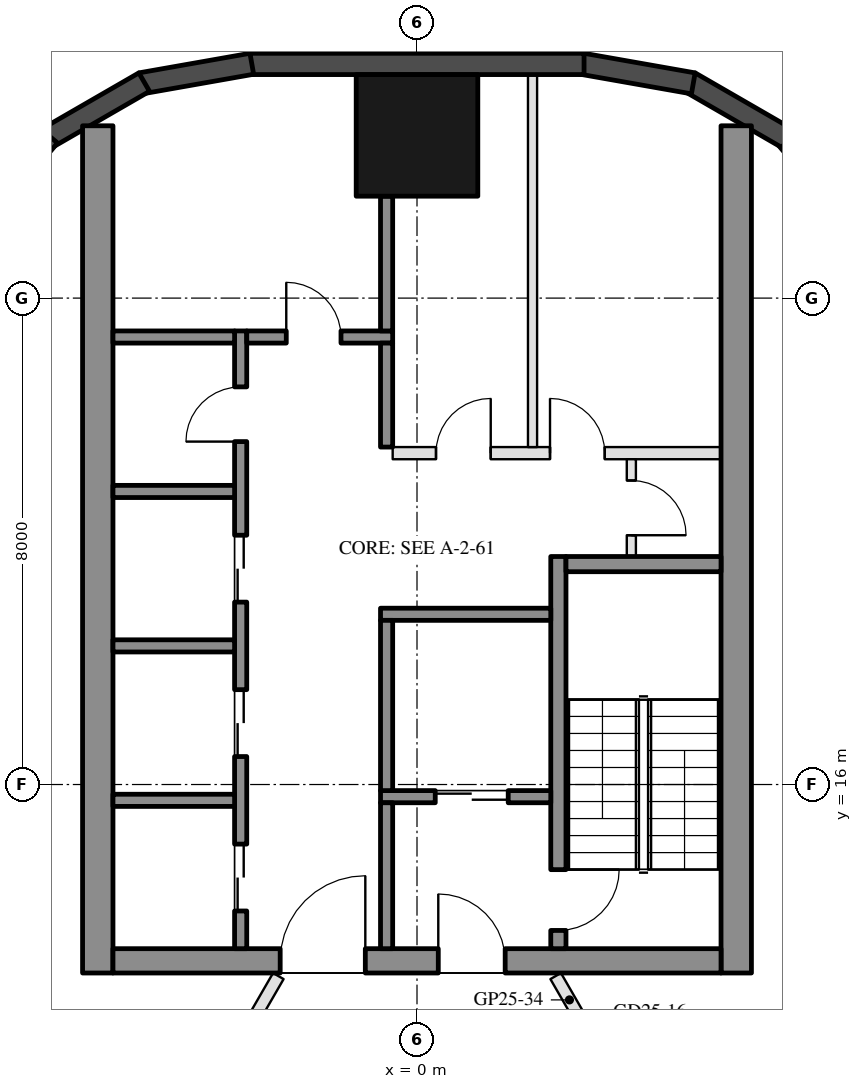
"""IFC4 building model, lengths in metres.
Left out: names, types, materials, properties, quantities, classifications, styles, units other than length and angle.
Written with IfcOpenShell. Run it as: python <this file> out.ifc"""

import sys

from ifc_helpers import new_model, si_unit, direction, frame, frame_2d, origin, origin_2d, place, context, subcontext, project, spatial, rectangle, hollow_rectangle, extrude, boolean, halfspace, element, fill, save


model = new_model("IFC4")
c1 = context("Model", 3, precision=1e-05, world=origin(), true_north=direction((0.0, 1.0)))
c2 = subcontext(c1, "Body", "Model", "MODEL_VIEW")
j1 = project(units=[si_unit("LENGTHUNIT", "METRE"), si_unit("PLANEANGLEUNIT", "RADIAN")], contexts=[c1])
p1 = place(None, origin())
s1 = spatial("IfcSite", under=j1, at=p1, CompositionType="ELEMENT")
p2 = place(p1, origin())
s2 = spatial("IfcBuilding", under=s1, at=p2, CompositionType="ELEMENT")
p3 = place(p2, frame((0.0, 0.0, 265.2)))
s3 = spatial("IfcBuildingStorey", under=s2, at=p3, CompositionType="ELEMENT", Elevation=265.2)
p4 = place(p3, frame((0.0, 26.676, 0.0), z_axis=(0.0, -0.21982618752, 0.975539054718), x_axis=(1.0, 0.0, 0.0)))
e1 = element("IfcColumn", 1, at=p4, inside=s3, PredefinedType="COLUMN", context=c2, shape_type="SweptSolid", body=[
    boolean("DIFFERENCE", boolean("DIFFERENCE", extrude(hollow_rectangle(XDim=2.0, YDim=2.0, WallThickness=0.05, at=origin_2d()), origin(), (0.0, 0.0, 1.0), 3.793), halfspace(frame((0.0, 0.0, 0.113), z_axis=(0.0, 0.0, 1.0), x_axis=(1.0, 0.0, 0.0)), True)), halfspace(frame((0.0, 0.0, 3.679), z_axis=(0.0, 0.0, 1.0), x_axis=(1.0, 0.0, 0.0)), False)),
])
p5 = place(p3, frame((7.239, 25.243, 0.0), z_axis=(0.0, 0.0, 1.0), x_axis=(-0.642756798522, 0.7660702957, 0.0)))
e2 = element("IfcWall", 2, at=p5, inside=s3, PredefinedType="SOLIDWALL", context=c2, shape_type="SweptSolid", body=[
    extrude(rectangle(XDim=1.855, YDim=0.35, at=frame_2d((0.928, 0.0))), origin(), (0.0, 0.0, 1.0), 3.55),
])
p6 = place(p3, frame((6.093, 26.625, 0.0), z_axis=(0.0, 0.0, 1.0), x_axis=(-0.866080385203, 0.499904757295, 0.0)))
e3 = element("IfcWall", 3, at=p6, inside=s3, PredefinedType="SOLIDWALL", context=c2, shape_type="SweptSolid", body=[
    extrude(rectangle(XDim=1.855, YDim=0.35, at=frame_2d((0.927, 0.0))), origin(), (0.0, 0.0, 1.0), 3.55),
])
p7 = place(p3, frame((4.544, 27.532, 0.0), z_axis=(0.0, 0.0, 1.0), x_axis=(-0.984795480386, 0.173717764815, 0.0)))
e4 = element("IfcWall", 4, at=p7, inside=s3, PredefinedType="SOLIDWALL", context=c2, shape_type="SweptSolid", body=[
    extrude(rectangle(XDim=1.855, YDim=0.35, at=frame_2d((0.928, 0.0))), origin(), (0.0, 0.0, 1.0), 3.55),
])
p8 = place(p3, frame((2.747, 27.851, 0.0), z_axis=(0.0, 0.0, 1.0), x_axis=(-1.0, 0.0, 0.0)))
e5 = element("IfcWall", 5, at=p8, inside=s3, PredefinedType="SOLIDWALL", context=c2, shape_type="SweptSolid", body=[
    extrude(rectangle(XDim=5.495, YDim=0.35, at=frame_2d((2.747, 0.0))), origin(), (0.0, 0.0, 1.0), 3.55),
])
p9 = place(p3, frame((-2.717, 27.854, 0.0), z_axis=(0.0, 0.0, 1.0), x_axis=(-0.984795480386, -0.173717764815, 0.0)))
e6 = element("IfcWall", 6, at=p9, inside=s3, PredefinedType="SOLIDWALL", context=c2, shape_type="SweptSolid", body=[
    extrude(rectangle(XDim=1.855, YDim=0.35, at=frame_2d((0.928, 0.0))), origin(), (0.0, 0.0, 1.0), 3.55),
])
p10 = place(p3, frame((-4.487, 27.552, 0.0), z_axis=(0.0, 0.0, 1.0), x_axis=(-0.866080385203, -0.499904757295, 0.0)))
e7 = element("IfcWall", 7, at=p10, inside=s3, PredefinedType="SOLIDWALL", context=c2, shape_type="SweptSolid", body=[
    extrude(rectangle(XDim=1.855, YDim=0.35, at=frame_2d((0.927, 0.0))), origin(), (0.0, 0.0, 1.0), 3.55),
])
p11 = place(p3, frame((-6.046, 26.664, 0.0), z_axis=(0.0, 0.0, 1.0), x_axis=(-0.642756798522, -0.7660702957, 0.0)))
e8 = element("IfcWall", 8, at=p11, inside=s3, PredefinedType="SOLIDWALL", context=c2, shape_type="SweptSolid", body=[
    extrude(rectangle(XDim=1.855, YDim=0.35, at=frame_2d((0.928, 0.0))), origin(), (0.0, 0.0, 1.0), 3.55),
])
for number, where, z_axis, x_axis in (
    (9, (5.25, 12.9, 0.0), (0.0, 0.0, 1.0), (0.0, 1.0, 0.0)),
    (10, (-5.25, 12.9, 0.0), (0.0, 0.0, 1.0), (0.0, 1.0, 0.0)),
):
    element("IfcWall", number, at=place(p3, frame(where, z_axis=z_axis, x_axis=x_axis)), inside=s3, PredefinedType="SHEAR", context=c2, shape_type="SweptSolid", body=[
        extrude(rectangle(XDim=13.934, YDim=0.5, at=frame_2d((6.967, 0.0))), origin(), (0.0, 0.0, 1.0), 3.5),
    ])
p12 = place(p3, frame((5.0, 13.1, 0.0), z_axis=(0.0, 0.0, 1.0), x_axis=(-1.0, 0.0, 0.0)))
e11 = element("IfcWall", 11, at=p12, inside=s3, PredefinedType="SHEAR", context=c2, shape_type="SweptSolid", body=[
    extrude(rectangle(XDim=10.0, YDim=0.4, at=frame_2d((5.0, 0.0))), origin(), (0.0, 0.0, 1.0), 3.5),
])
p13 = place(p12, frame((3.55, 0.0, 0.0)))
e12 = element("IfcOpeningElement", 12, at=p13, cuts=e11, PredefinedType="OPENING", context=c2, shape_type="SweptSolid", body=[
    extrude(rectangle(XDim=1.1, YDim=2.1, at=frame_2d((0.55, 1.05))), frame((0.0, 0.21, 0.0), z_axis=(0.0, -1.0, 0.0), x_axis=(1.0, 0.0, 0.0)), (0.0, 0.0, 1.0), 0.42),
])
p14 = place(p12, frame((5.85, 0.0, 0.0)))
e13 = element("IfcOpeningElement", 13, at=p14, cuts=e11, PredefinedType="OPENING", context=c2, shape_type="SweptSolid", body=[
    extrude(rectangle(XDim=1.4, YDim=2.1, at=frame_2d((0.7, 1.05))), frame((0.0, 0.21, 0.0), z_axis=(0.0, -1.0, 0.0), x_axis=(1.0, 0.0, 0.0)), (0.0, 0.0, 1.0), 0.42),
])
p15 = place(p3, frame((2.325, 13.3, 0.0), z_axis=(0.0, 0.0, 1.0), x_axis=(0.0, 1.0, 0.0)))
e14 = element("IfcWall", 14, at=p15, inside=s3, PredefinedType="SHEAR", context=c2, shape_type="SweptSolid", body=[
    extrude(rectangle(XDim=6.45, YDim=0.25, at=frame_2d((3.225, 0.0))), origin(), (0.0, 0.0, 1.0), 3.5),
])
p16 = place(p15, frame((0.3, 0.0, 0.0)))
e15 = element("IfcOpeningElement", 15, at=p16, cuts=e14, PredefinedType="OPENING", context=c2, shape_type="SweptSolid", body=[
    extrude(rectangle(XDim=1.0, YDim=2.1, at=frame_2d((0.5, 1.05))), frame((0.0, 0.135, 0.0), z_axis=(0.0, -1.0, 0.0), x_axis=(1.0, 0.0, 0.0)), (0.0, 0.0, 1.0), 0.27),
])
p17 = place(p3, frame((5.0, 19.625, 0.0), z_axis=(0.0, 0.0, 1.0), x_axis=(-1.0, 0.0, 0.0)))
e16 = element("IfcWall", 16, at=p17, inside=s3, PredefinedType="SHEAR", context=c2, shape_type="SweptSolid", body=[
    extrude(rectangle(XDim=2.55, YDim=0.25, at=frame_2d((1.275, 0.0))), origin(), (0.0, 0.0, 1.0), 3.5),
])
p18 = place(p3, frame((2.2, 18.8, 0.0), z_axis=(0.0, 0.0, 1.0), x_axis=(-1.0, 0.0, 0.0)))
e17 = element("IfcWall", 17, at=p18, inside=s3, PredefinedType="SHEAR", context=c2, shape_type="SweptSolid", body=[
    extrude(rectangle(XDim=2.8, YDim=0.2, at=frame_2d((1.4, 0.0))), origin(), (0.0, 0.0, 1.0), 3.5),
])
p19 = place(p3, frame((2.2, 15.8, 0.0), z_axis=(0.0, 0.0, 1.0), x_axis=(-1.0, 0.0, 0.0)))
e18 = element("IfcWall", 18, at=p19, inside=s3, PredefinedType="SHEAR", context=c2, shape_type="SweptSolid", body=[
    extrude(rectangle(XDim=2.8, YDim=0.2, at=frame_2d((1.4, 0.0))), origin(), (0.0, 0.0, 1.0), 3.5),
])
p20 = place(p19, frame((0.7, 0.0, 0.0)))
e19 = element("IfcOpeningElement", 19, at=p20, cuts=e18, PredefinedType="OPENING", context=c2, shape_type="SweptSolid", body=[
    extrude(rectangle(XDim=1.2, YDim=2.1, at=frame_2d((0.6, 1.05))), frame((0.0, 0.11, 0.0), z_axis=(0.0, -1.0, 0.0), x_axis=(1.0, 0.0, 0.0)), (0.0, 0.0, 1.0), 0.22),
])
p21 = place(p3, frame((-0.5, 15.9, 0.0), z_axis=(0.0, 0.0, 1.0), x_axis=(0.0, 1.0, 0.0)))
e20 = element("IfcWall", 20, at=p21, inside=s3, PredefinedType="SHEAR", context=c2, shape_type="SweptSolid", body=[
    extrude(rectangle(XDim=2.8, YDim=0.2, at=frame_2d((1.4, 0.0))), origin(), (0.0, 0.0, 1.0), 3.5),
])
p22 = place(p3, frame((-0.5, 13.3, 0.0), z_axis=(0.0, 0.0, 1.0), x_axis=(0.0, 1.0, 0.0)))
e21 = element("IfcWall", 21, at=p22, inside=s3, PredefinedType="SHEAR", context=c2, shape_type="SweptSolid", body=[
    extrude(rectangle(XDim=2.4, YDim=0.2, at=frame_2d((1.2, 0.0))), origin(), (0.0, 0.0, 1.0), 3.5),
])
p23 = place(p3, frame((-2.9, 13.3, 0.0), z_axis=(0.0, 0.0, 1.0), x_axis=(0.0, 1.0, 0.0)))
e22 = element("IfcWall", 22, at=p23, inside=s3, PredefinedType="SHEAR", context=c2, shape_type="SweptSolid", body=[
    extrude(rectangle(XDim=10.16, YDim=0.2, at=frame_2d((5.08, 0.0))), origin(), (0.0, 0.0, 1.0), 3.5),
])
p24 = place(p23, frame((0.62, 0.0, 0.0)))
e23 = element("IfcOpeningElement", 23, at=p24, cuts=e22, PredefinedType="OPENING", context=c2, shape_type="SweptSolid", body=[
    extrude(rectangle(XDim=1.1, YDim=2.1, at=frame_2d((0.55, 1.05))), frame((0.0, 0.11, 0.0), z_axis=(0.0, -1.0, 0.0), x_axis=(1.0, 0.0, 0.0)), (0.0, 0.0, 1.0), 0.22),
])
p25 = place(p23, frame((3.16, 0.0, 0.0)))
e24 = element("IfcOpeningElement", 24, at=p25, cuts=e22, PredefinedType="OPENING", context=c2, shape_type="SweptSolid", body=[
    extrude(rectangle(XDim=1.1, YDim=2.1, at=frame_2d((0.55, 1.05))), frame((0.0, 0.11, 0.0), z_axis=(0.0, -1.0, 0.0), x_axis=(1.0, 0.0, 0.0)), (0.0, 0.0, 1.0), 0.22),
])
p26 = place(p23, frame((5.7, 0.0, 0.0)))
e25 = element("IfcOpeningElement", 25, at=p26, cuts=e22, PredefinedType="OPENING", context=c2, shape_type="SweptSolid", body=[
    extrude(rectangle(XDim=1.1, YDim=2.1, at=frame_2d((0.55, 1.05))), frame((0.0, 0.11, 0.0), z_axis=(0.0, -1.0, 0.0), x_axis=(1.0, 0.0, 0.0)), (0.0, 0.0, 1.0), 0.22),
])
p27 = place(p23, frame((8.34, 0.0, 0.0)))
e26 = element("IfcOpeningElement", 26, at=p27, cuts=e22, PredefinedType="OPENING", context=c2, shape_type="SweptSolid", body=[
    extrude(rectangle(XDim=0.9, YDim=2.1, at=frame_2d((0.45, 1.05))), frame((0.0, 0.11, 0.0), z_axis=(0.0, -1.0, 0.0), x_axis=(1.0, 0.0, 0.0)), (0.0, 0.0, 1.0), 0.22),
])
p28 = place(p3, frame((-0.4, 23.36, 0.0), z_axis=(0.0, 0.0, 1.0), x_axis=(-1.0, 0.0, 0.0)))
e27 = element("IfcWall", 27, at=p28, inside=s3, PredefinedType="SHEAR", context=c2, shape_type="SweptSolid", body=[
    extrude(rectangle(XDim=2.4, YDim=0.2, at=frame_2d((1.2, 0.0))), origin(), (0.0, 0.0, 1.0), 3.5),
])
p29 = place(p28, frame((0.85, 0.0, 0.0)))
e28 = element("IfcOpeningElement", 28, at=p29, cuts=e27, PredefinedType="OPENING", context=c2, shape_type="SweptSolid", body=[
    extrude(rectangle(XDim=0.9, YDim=2.1, at=frame_2d((0.45, 1.05))), frame((0.0, 0.11, 0.0), z_axis=(0.0, -1.0, 0.0), x_axis=(1.0, 0.0, 0.0)), (0.0, 0.0, 1.0), 0.22),
])
p30 = place(p3, frame((-0.5, 21.55, 0.0), z_axis=(0.0, 0.0, 1.0), x_axis=(0.0, 1.0, 0.0)))
e29 = element("IfcWall", 29, at=p30, inside=s3, PredefinedType="SHEAR", context=c2, shape_type="SweptSolid", body=[
    extrude(rectangle(XDim=1.71, YDim=0.2, at=frame_2d((0.855, 0.0))), origin(), (0.0, 0.0, 1.0), 3.5),
])
for number, where, z_axis, x_axis in (
    (30, (-3.0, 15.74, 0.0), (0.0, 0.0, 1.0), (-1.0, 0.0, 0.0)),
    (31, (-3.0, 18.28, 0.0), (0.0, 0.0, 1.0), (-1.0, 0.0, 0.0)),
    (32, (-3.0, 20.82, 0.0), (0.0, 0.0, 1.0), (-1.0, 0.0, 0.0)),
    (33, (-3.0, 23.36, 0.0), (0.0, 0.0, 1.0), (-1.0, 0.0, 0.0)),
):
    element("IfcWall", number, at=place(p3, frame(where, z_axis=z_axis, x_axis=x_axis)), inside=s3, PredefinedType="SHEAR", context=c2, shape_type="SweptSolid", body=[
        extrude(rectangle(XDim=2.0, YDim=0.2, at=frame_2d((1.0, 0.0))), origin(), (0.0, 0.0, 1.0), 3.5),
    ])
p31 = place(p3, frame((-0.5, 23.46, 0.0), z_axis=(0.0, 0.0, 1.0), x_axis=(0.0, 1.0, 0.0)))
e34 = element("IfcWall", 34, at=p31, inside=s3, PredefinedType="SHEAR", context=c2, shape_type="SweptSolid", body=[
    extrude(rectangle(XDim=2.216, YDim=0.2, at=frame_2d((1.108, 0.0))), origin(), (0.0, 0.0, 1.0), 3.5),
])
p32 = place(p3, frame((5.0, 21.45, 0.0), z_axis=(0.0, 0.0, 1.0), x_axis=(-1.0, 0.0, 0.0)))
e35 = element("IfcWall", 35, at=p32, inside=s3, PredefinedType="PARTITIONING", context=c2, shape_type="SweptSolid", body=[
    extrude(rectangle(XDim=5.4, YDim=0.2, at=frame_2d((2.7, 0.0))), origin(), (0.0, 0.0, 1.0), 3.5),
])
p33 = place(p32, frame((1.913, 0.0, 0.0)))
e36 = element("IfcOpeningElement", 36, at=p33, cuts=e35, PredefinedType="OPENING", context=c2, shape_type="SweptSolid", body=[
    extrude(rectangle(XDim=0.9, YDim=2.1, at=frame_2d((0.45, 1.05))), frame((0.0, 0.11, 0.0), z_axis=(0.0, -1.0, 0.0), x_axis=(1.0, 0.0, 0.0)), (0.0, 0.0, 1.0), 0.22),
])
p34 = place(p32, frame((3.788, 0.0, 0.0)))
e37 = element("IfcOpeningElement", 37, at=p34, cuts=e35, PredefinedType="OPENING", context=c2, shape_type="SweptSolid", body=[
    extrude(rectangle(XDim=0.9, YDim=2.1, at=frame_2d((0.45, 1.05))), frame((0.0, 0.11, 0.0), z_axis=(0.0, -1.0, 0.0), x_axis=(1.0, 0.0, 0.0)), (0.0, 0.0, 1.0), 0.22),
])
p35 = place(p3, frame((3.525, 19.75, 0.0), z_axis=(0.0, 0.0, 1.0), x_axis=(0.0, 1.0, 0.0)))
e38 = element("IfcWall", 38, at=p35, inside=s3, PredefinedType="PARTITIONING", context=c2, shape_type="SweptSolid", body=[
    extrude(rectangle(XDim=1.6, YDim=0.15, at=frame_2d((0.8, 0.0))), origin(), (0.0, 0.0, 1.0), 3.5),
])
p36 = place(p35, frame((0.35, 0.0, 0.0)))
e39 = element("IfcOpeningElement", 39, at=p36, cuts=e38, PredefinedType="OPENING", context=c2, shape_type="SweptSolid", body=[
    extrude(rectangle(XDim=0.9, YDim=2.1, at=frame_2d((0.45, 1.05))), frame((0.0, 0.085, 0.0), z_axis=(0.0, -1.0, 0.0), x_axis=(1.0, 0.0, 0.0)), (0.0, 0.0, 1.0), 0.17),
])
p37 = place(p3, frame((1.9, 21.55, 0.0), z_axis=(0.0, 0.0, 1.0), x_axis=(0.0, 1.0, 0.0)))
e40 = element("IfcWall", 40, at=p37, inside=s3, PredefinedType="PARTITIONING", context=c2, shape_type="SweptSolid", body=[
    extrude(rectangle(XDim=6.126, YDim=0.15, at=frame_2d((3.063, 0.0))), origin(), (0.0, 0.0, 1.0), 3.5),
])
p38 = place(p3, frame((13.766, 13.583, 0.0), z_axis=(0.0, 0.0, 1.0), x_axis=(-0.919210042537, -0.393767568115, 0.0)))
e41 = element("IfcWall", 41, at=p38, inside=s3, PredefinedType="PARTITIONING", context=c2, shape_type="SweptSolid", body=[
    extrude(rectangle(XDim=10.487, YDim=0.2, at=frame_2d((5.243, 0.0))), origin(), (0.0, 0.0, 1.0), 3.1),
])
p39 = place(p3, frame((-13.177, 12.804, 0.0), z_axis=(0.0, 0.0, 1.0), x_axis=(0.866021901412, -0.500006066238, 0.0)))
e42 = element("IfcWall", 42, at=p39, inside=s3, PredefinedType="PARTITIONING", context=c2, shape_type="SweptSolid", body=[
    extrude(rectangle(XDim=9.513, YDim=0.2, at=frame_2d((4.757, 0.0))), origin(), (0.0, 0.0, 1.0), 3.1),
])
p40 = place(p3, frame((14.336, 12.595, 0.0), z_axis=(0.0, 0.0, 1.0), x_axis=(-0.880794466183, -0.473498794445, 0.0)))
e43 = element("IfcWall", 43, at=p40, inside=s3, PredefinedType="PARTITIONING", context=c2, shape_type="SweptSolid", body=[
    extrude(rectangle(XDim=10.418, YDim=0.15, at=frame_2d((5.209, 0.0))), origin(), (0.0, 0.0, 1.0), 3.0),
])
p41 = place(p3, frame((2.281, 12.85, 0.0), z_axis=(0.0, 0.0, 1.0), x_axis=(0.499978071388, -0.866038063904, 0.0)))
e44 = element("IfcWall", 44, at=p41, inside=s3, PredefinedType="PARTITIONING", context=c2, shape_type="SweptSolid", body=[
    extrude(rectangle(XDim=3.776, YDim=0.2, at=frame_2d((1.888, 0.0))), origin(), (0.0, 0.0, 1.0), 3.0),
])
p42 = place(p41, frame((1.388, 0.0, 0.0)))
e45 = element("IfcOpeningElement", 45, at=p42, cuts=e44, PredefinedType="OPENING", context=c2, shape_type="SweptSolid", body=[
    extrude(rectangle(XDim=1.0, YDim=2.1, at=frame_2d((0.5, 1.05))), frame((0.0, 0.11, 0.0), z_axis=(0.0, -1.0, 0.0), x_axis=(1.0, 0.0, 0.0)), (0.0, 0.0, 1.0), 0.22),
])
p43 = place(p3, frame((-4.975, 8.184, 0.0), z_axis=(0.0, 0.0, 1.0), x_axis=(0.499983925036, 0.86603468447, 0.0)))
e46 = element("IfcWall", 46, at=p43, inside=s3, PredefinedType="PARTITIONING", context=c2, shape_type="SweptSolid", body=[
    extrude(rectangle(XDim=5.388, YDim=0.2, at=frame_2d((2.694, 0.0))), origin(), (0.0, 0.0, 1.0), 3.0),
])
p44 = place(p43, frame((2.194, 0.0, 0.0)))
e47 = element("IfcOpeningElement", 47, at=p44, cuts=e46, PredefinedType="OPENING", context=c2, shape_type="SweptSolid", body=[
    extrude(rectangle(XDim=1.0, YDim=2.1, at=frame_2d((0.5, 1.05))), frame((0.0, 0.11, 0.0), z_axis=(0.0, -1.0, 0.0), x_axis=(1.0, 0.0, 0.0)), (0.0, 0.0, 1.0), 0.22),
])
p45 = place(p20, origin())
e48 = element("IfcDoor", 48, at=p45, inside=s3, OperationType="DOUBLE_DOOR_SLIDING", PredefinedType="DOOR", context=c2, shape_type="SweptSolid", body=[
    extrude(rectangle(XDim=1.2, YDim=2.1, at=frame_2d((0.6, 1.05))), frame((0.0, 0.025, 0.0), z_axis=(0.0, -1.0, 0.0), x_axis=(1.0, 0.0, 0.0)), (0.0, 0.0, 1.0), 0.05),
])
fill(e19, e48)
p46 = place(p36, frame((0.9, 0.0, 0.0), z_axis=(0.0, 0.0, 1.0), x_axis=(-1.0, 0.0, 0.0)))
e49 = element("IfcDoor", 49, at=p46, inside=s3, OperationType="SINGLE_SWING_RIGHT", PredefinedType="DOOR", context=c2, shape_type="SweptSolid", body=[
    extrude(rectangle(XDim=0.9, YDim=2.1, at=frame_2d((0.45, 1.05))), frame((0.0, 0.025, 0.0), z_axis=(0.0, -1.0, 0.0), x_axis=(1.0, 0.0, 0.0)), (0.0, 0.0, 1.0), 0.05),
])
fill(e39, e49)
p47 = place(p24, origin())
e50 = element("IfcDoor", 50, at=p47, inside=s3, OperationType="DOUBLE_DOOR_SLIDING", PredefinedType="DOOR", context=c2, shape_type="SweptSolid", body=[
    extrude(rectangle(XDim=1.1, YDim=2.1, at=frame_2d((0.55, 1.05))), frame((0.0, 0.025, 0.0), z_axis=(0.0, -1.0, 0.0), x_axis=(1.0, 0.0, 0.0)), (0.0, 0.0, 1.0), 0.05),
])
fill(e23, e50)
p48 = place(p25, origin())
e51 = element("IfcDoor", 51, at=p48, inside=s3, OperationType="DOUBLE_DOOR_SLIDING", PredefinedType="DOOR", context=c2, shape_type="SweptSolid", body=[
    extrude(rectangle(XDim=1.1, YDim=2.1, at=frame_2d((0.55, 1.05))), frame((0.0, 0.025, 0.0), z_axis=(0.0, -1.0, 0.0), x_axis=(1.0, 0.0, 0.0)), (0.0, 0.0, 1.0), 0.05),
])
fill(e24, e51)
p49 = place(p26, origin())
e52 = element("IfcDoor", 52, at=p49, inside=s3, OperationType="DOUBLE_DOOR_SLIDING", PredefinedType="DOOR", context=c2, shape_type="SweptSolid", body=[
    extrude(rectangle(XDim=1.1, YDim=2.1, at=frame_2d((0.55, 1.05))), frame((0.0, 0.025, 0.0), z_axis=(0.0, -1.0, 0.0), x_axis=(1.0, 0.0, 0.0)), (0.0, 0.0, 1.0), 0.05),
])
fill(e25, e52)
p50 = place(p27, origin())
e53 = element("IfcDoor", 53, at=p50, inside=s3, OperationType="SINGLE_SWING_LEFT", PredefinedType="DOOR", context=c2, shape_type="SweptSolid", body=[
    extrude(rectangle(XDim=0.9, YDim=2.1, at=frame_2d((0.45, 1.05))), frame((0.0, 0.025, 0.0), z_axis=(0.0, -1.0, 0.0), x_axis=(1.0, 0.0, 0.0)), (0.0, 0.0, 1.0), 0.05),
])
fill(e26, e53)
p51 = place(p29, frame((0.9, 0.0, 0.0), z_axis=(0.0, 0.0, 1.0), x_axis=(-1.0, 0.0, 0.0)))
e54 = element("IfcDoor", 54, at=p51, inside=s3, OperationType="SINGLE_SWING_LEFT", PredefinedType="DOOR", context=c2, shape_type="SweptSolid", body=[
    extrude(rectangle(XDim=0.9, YDim=2.1, at=frame_2d((0.45, 1.05))), frame((0.0, 0.025, 0.0), z_axis=(0.0, -1.0, 0.0), x_axis=(1.0, 0.0, 0.0)), (0.0, 0.0, 1.0), 0.05),
])
fill(e28, e54)
p52 = place(p33, frame((0.9, 0.0, 0.0), z_axis=(0.0, 0.0, 1.0), x_axis=(-1.0, 0.0, 0.0)))
e55 = element("IfcDoor", 55, at=p52, inside=s3, OperationType="SINGLE_SWING_LEFT", PredefinedType="DOOR", context=c2, shape_type="SweptSolid", body=[
    extrude(rectangle(XDim=0.9, YDim=2.1, at=frame_2d((0.45, 1.05))), frame((0.0, 0.025, 0.0), z_axis=(0.0, -1.0, 0.0), x_axis=(1.0, 0.0, 0.0)), (0.0, 0.0, 1.0), 0.05),
])
fill(e36, e55)
p53 = place(p34, frame((0.9, 0.0, 0.0), z_axis=(0.0, 0.0, 1.0), x_axis=(-1.0, 0.0, 0.0)))
e56 = element("IfcDoor", 56, at=p53, inside=s3, OperationType="SINGLE_SWING_RIGHT", PredefinedType="DOOR", context=c2, shape_type="SweptSolid", body=[
    extrude(rectangle(XDim=0.9, YDim=2.1, at=frame_2d((0.45, 1.05))), frame((0.0, 0.025, 0.0), z_axis=(0.0, -1.0, 0.0), x_axis=(1.0, 0.0, 0.0)), (0.0, 0.0, 1.0), 0.05),
])
fill(e37, e56)
p54 = place(p13, frame((1.1, 0.0, 0.0), z_axis=(0.0, 0.0, 1.0), x_axis=(-1.0, 0.0, 0.0)))
e57 = element("IfcDoor", 57, at=p54, inside=s3, OperationType="SINGLE_SWING_LEFT", PredefinedType="DOOR", context=c2, shape_type="SweptSolid", body=[
    extrude(rectangle(XDim=1.1, YDim=2.1, at=frame_2d((0.55, 1.05))), frame((0.0, 0.025, 0.0), z_axis=(0.0, -1.0, 0.0), x_axis=(1.0, 0.0, 0.0)), (0.0, 0.0, 1.0), 0.05),
])
fill(e12, e57)
p55 = place(p14, frame((1.4, 0.0, 0.0), z_axis=(0.0, 0.0, 1.0), x_axis=(-1.0, 0.0, 0.0)))
e58 = element("IfcDoor", 58, at=p55, inside=s3, OperationType="DOUBLE_DOOR_SINGLE_SWING", PredefinedType="DOOR", context=c2, shape_type="SweptSolid", body=[
    extrude(rectangle(XDim=1.4, YDim=2.1, at=frame_2d((0.7, 1.05))), frame((0.0, 0.025, 0.0), z_axis=(0.0, -1.0, 0.0), x_axis=(1.0, 0.0, 0.0)), (0.0, 0.0, 1.0), 0.05),
])
fill(e13, e58)
p56 = place(p16, frame((1.0, 0.0, 0.0), z_axis=(0.0, 0.0, 1.0), x_axis=(-1.0, 0.0, 0.0)))
e59 = element("IfcDoor", 59, at=p56, inside=s3, OperationType="SINGLE_SWING_LEFT", PredefinedType="DOOR", context=c2, shape_type="SweptSolid", body=[
    extrude(rectangle(XDim=1.0, YDim=2.1, at=frame_2d((0.5, 1.05))), frame((0.0, 0.025, 0.0), z_axis=(0.0, -1.0, 0.0), x_axis=(1.0, 0.0, 0.0)), (0.0, 0.0, 1.0), 0.05),
])
fill(e15, e59)
save(model, sys.argv[1])
